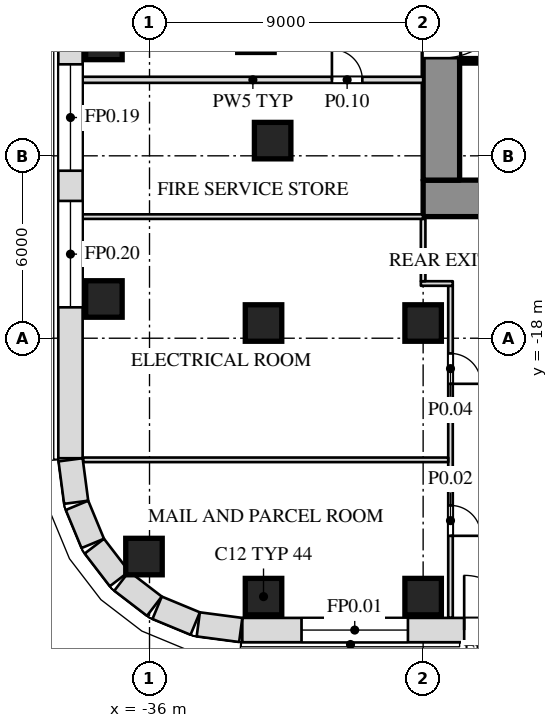
"""IFC4 building model, lengths in metres.
Left out: names, types, materials, properties, quantities, classifications, styles, units other than length and angle.
Written with IfcOpenShell. Run it as: python <this file> out.ifc"""

import sys

from ifc_helpers import new_model, si_unit, direction, frame, frame_2d, origin, origin_2d, place, context, subcontext, project, spatial, rectangle, extrude, element, fill, save


model = new_model("IFC4")
c1 = context("Model", 3, precision=1e-05, world=origin(), true_north=direction((0.0, 1.0)))
c2 = subcontext(c1, "Body", "Model", "MODEL_VIEW")
j1 = project(units=[si_unit("LENGTHUNIT", "METRE"), si_unit("PLANEANGLEUNIT", "RADIAN")], contexts=[c1])
p1 = place(None, origin())
s1 = spatial("IfcSite", under=j1, at=p1, CompositionType="ELEMENT")
p2 = place(p1, origin())
s2 = spatial("IfcBuilding", under=s1, at=p2, CompositionType="ELEMENT")
p3 = place(p2, origin())
s3 = spatial("IfcBuildingStorey", under=s2, at=p3, CompositionType="ELEMENT", Elevation=0.0)
for number, where, z_axis, x_axis in (
    (1, (-32.25, -26.5, 0.0), (0.0, 0.0, 1.0), (1.0, 0.0, 0.0)),
    (2, (-27.0, -26.5, 0.0), (0.0, 0.0, 1.0), (1.0, 0.0, 0.0)),
    (3, (-36.182, -25.182, 0.0), (0.0, 0.0, 1.0), (1.0, 0.0, 0.0)),
    (4, (-32.25, -17.5, 0.0), (0.0, 0.0, 1.0), (1.0, 0.0, 0.0)),
    (5, (-27.0, -17.5, 0.0), (0.0, 0.0, 1.0), (1.0, 0.0, 0.0)),
    (6, (-37.5, -16.709, 0.0), (0.0, 0.0, 1.0), (1.0, 0.0, 0.0)),
    (7, (-31.95, -11.5, 0.0), (0.0, 0.0, 1.0), (1.0, 0.0, 0.0)),
    (8, (-37.5, -8.236, 0.0), (0.0, 0.0, 1.0), (1.0, 0.0, 0.0)),
):
    element("IfcColumn", number, at=place(p3, frame(where, z_axis=z_axis, x_axis=x_axis)), inside=s3, PredefinedType="COLUMN", context=c2, shape_type="SweptSolid", body=[
        extrude(rectangle(XDim=1.2, YDim=1.2, at=origin_2d()), origin(), (0.0, 0.0, 1.0), 9.0),
    ])
p4 = place(p3, frame((-27.0, -13.4, 0.0), z_axis=(0.0, 0.0, 1.0), x_axis=(1.0, 0.0, 0.0)))
e9 = element("IfcWall", 9, at=p4, inside=s3, PredefinedType="SHEAR", context=c2, shape_type="SweptSolid", body=[
    extrude(rectangle(XDim=54.0, YDim=1.2, at=frame_2d((27.0, 0.0))), origin(), (0.0, 0.0, 1.0), 8.7),
])
p5 = place(p4, frame((7.075, 0.0, 0.0)))
e10 = element("IfcOpeningElement", 10, at=p5, cuts=e9, PredefinedType="OPENING", context=c2, shape_type="SweptSolid", body=[
    extrude(rectangle(XDim=1.4, YDim=2.1, at=frame_2d((0.7, 1.05))), frame((0.0, 0.612, 0.0), z_axis=(0.0, -1.0, 0.0), x_axis=(1.0, 0.0, 0.0)), (0.0, 0.0, 1.0), 1.224),
])
p6 = place(p4, frame((16.45, 0.0, 0.0)))
e11 = element("IfcOpeningElement", 11, at=p6, cuts=e9, PredefinedType="OPENING", context=c2, shape_type="SweptSolid", body=[
    extrude(rectangle(XDim=1.0, YDim=2.1, at=frame_2d((0.5, 1.05))), frame((0.0, 0.612, 0.0), z_axis=(0.0, -1.0, 0.0), x_axis=(1.0, 0.0, 0.0)), (0.0, 0.0, 1.0), 1.224),
])
p7 = place(p4, frame((18.525, 0.0, 0.0)))
e12 = element("IfcOpeningElement", 12, at=p7, cuts=e9, PredefinedType="OPENING", context=c2, shape_type="SweptSolid", body=[
    extrude(rectangle(XDim=1.4, YDim=2.1, at=frame_2d((0.7, 1.05))), frame((0.0, 0.612, 0.0), z_axis=(0.0, -1.0, 0.0), x_axis=(1.0, 0.0, 0.0)), (0.0, 0.0, 1.0), 1.224),
])
p8 = place(p4, frame((34.075, 0.0, 0.0)))
e13 = element("IfcOpeningElement", 13, at=p8, cuts=e9, PredefinedType="OPENING", context=c2, shape_type="SweptSolid", body=[
    extrude(rectangle(XDim=1.4, YDim=2.1, at=frame_2d((0.7, 1.05))), frame((0.0, 0.612, 0.0), z_axis=(0.0, -1.0, 0.0), x_axis=(1.0, 0.0, 0.0)), (0.0, 0.0, 1.0), 1.224),
])
p9 = place(p4, frame((36.55, 0.0, 0.0)))
e14 = element("IfcOpeningElement", 14, at=p9, cuts=e9, PredefinedType="OPENING", context=c2, shape_type="SweptSolid", body=[
    extrude(rectangle(XDim=1.0, YDim=2.1, at=frame_2d((0.5, 1.05))), frame((0.0, 0.612, 0.0), z_axis=(0.0, -1.0, 0.0), x_axis=(1.0, 0.0, 0.0)), (0.0, 0.0, 1.0), 1.224),
])
p10 = place(p4, frame((45.525, 0.0, 0.0)))
e15 = element("IfcOpeningElement", 15, at=p10, cuts=e9, PredefinedType="OPENING", context=c2, shape_type="SweptSolid", body=[
    extrude(rectangle(XDim=1.4, YDim=2.1, at=frame_2d((0.7, 1.05))), frame((0.0, 0.612, 0.0), z_axis=(0.0, -1.0, 0.0), x_axis=(1.0, 0.0, 0.0)), (0.0, 0.0, 1.0), 1.224),
])
p11 = place(p3, frame((-26.4, -12.8, 0.0), z_axis=(0.0, 0.0, 1.0), x_axis=(0.0, 1.0, 0.0)))
e16 = element("IfcWall", 16, at=p11, inside=s3, PredefinedType="SHEAR", context=c2, shape_type="SweptSolid", body=[
    extrude(rectangle(XDim=9.6, YDim=1.2, at=frame_2d((4.8, 0.0))), origin(), (0.0, 0.0, 1.0), 8.7),
])
p12 = place(p11, frame((4.012, 0.0, 0.0)))
e17 = element("IfcOpeningElement", 17, at=p12, cuts=e16, PredefinedType="OPENING", context=c2, shape_type="SweptSolid", body=[
    extrude(rectangle(XDim=2.4, YDim=2.1, at=frame_2d((1.2, 1.05))), frame((0.0, 0.612, 0.0), z_axis=(0.0, -1.0, 0.0), x_axis=(1.0, 0.0, 0.0)), (0.0, 0.0, 1.0), 1.224),
])
p13 = place(p3, frame((-26.1, -27.2, 0.0), z_axis=(0.0, 0.0, 1.0), x_axis=(0.0, 1.0, 0.0)))
e18 = element("IfcWall", 18, at=p13, inside=s3, PredefinedType="PARTITIONING", context=c2, shape_type="SweptSolid", body=[
    extrude(rectangle(XDim=10.925, YDim=0.15, at=frame_2d((5.462, 0.0))), origin(), (0.0, 0.0, 1.0), 8.7),
])
p14 = place(p13, frame((2.7, 0.0, 0.0)))
e19 = element("IfcOpeningElement", 19, at=p14, cuts=e18, PredefinedType="OPENING", context=c2, shape_type="SweptSolid", body=[
    extrude(rectangle(XDim=1.0, YDim=2.1, at=frame_2d((0.5, 1.05))), frame((0.0, 0.087, 0.0), z_axis=(0.0, -1.0, 0.0), x_axis=(1.0, 0.0, 0.0)), (0.0, 0.0, 1.0), 0.174),
])
p15 = place(p13, frame((7.7, 0.0, 0.0)))
e20 = element("IfcOpeningElement", 20, at=p15, cuts=e18, PredefinedType="OPENING", context=c2, shape_type="SweptSolid", body=[
    extrude(rectangle(XDim=1.0, YDim=2.1, at=frame_2d((0.5, 1.05))), frame((0.0, 0.087, 0.0), z_axis=(0.0, -1.0, 0.0), x_axis=(1.0, 0.0, 0.0)), (0.0, 0.0, 1.0), 0.174),
])
p16 = place(p3, frame((-38.18, -22.0, 0.0), z_axis=(0.0, 0.0, 1.0), x_axis=(1.0, 0.0, 0.0)))
e21 = element("IfcWall", 21, at=p16, inside=s3, PredefinedType="PARTITIONING", context=c2, shape_type="SweptSolid", body=[
    extrude(rectangle(XDim=12.005, YDim=0.15, at=frame_2d((6.002, 0.0))), origin(), (0.0, 0.0, 1.0), 8.7),
])
p17 = place(p3, frame((-27.075, -16.2, 0.0), z_axis=(0.0, 0.0, 1.0), x_axis=(1.0, 0.0, 0.0)))
e22 = element("IfcWall", 22, at=p17, inside=s3, PredefinedType="PARTITIONING", context=c2, shape_type="SweptSolid", body=[
    extrude(rectangle(XDim=1.05, YDim=0.15, at=frame_2d((0.525, 0.0))), origin(), (0.0, 0.0, 1.0), 8.7),
])
p18 = place(p3, frame((-27.0, -16.125, 0.0), z_axis=(0.0, 0.0, 1.0), x_axis=(0.0, 1.0, 0.0)))
e23 = element("IfcWall", 23, at=p18, inside=s3, PredefinedType="PARTITIONING", context=c2, shape_type="SweptSolid", body=[
    extrude(rectangle(XDim=2.05, YDim=0.15, at=frame_2d((1.025, 0.0))), origin(), (0.0, 0.0, 1.0), 8.088),
])
p19 = place(p3, frame((-38.2, -14.0, 0.0), z_axis=(0.0, 0.0, 1.0), x_axis=(1.0, 0.0, 0.0)))
e24 = element("IfcWall", 24, at=p19, inside=s3, PredefinedType="PARTITIONING", context=c2, shape_type="SweptSolid", body=[
    extrude(rectangle(XDim=11.195, YDim=0.15, at=frame_2d((5.598, 0.0))), origin(), (0.0, 0.0, 1.0), 8.7),
])
p20 = place(p3, frame((-38.2, -9.5, 0.0), z_axis=(0.0, 0.0, 1.0), x_axis=(1.0, 0.0, 0.0)))
e25 = element("IfcWall", 25, at=p20, inside=s3, PredefinedType="PARTITIONING", context=c2, shape_type="SweptSolid", body=[
    extrude(rectangle(XDim=11.2, YDim=0.2, at=frame_2d((5.6, 0.0))), origin(), (0.0, 0.0, 1.0), 8.7),
])
p21 = place(p20, frame((8.2, 0.0, 0.0)))
e26 = element("IfcOpeningElement", 26, at=p21, cuts=e25, PredefinedType="OPENING", context=c2, shape_type="SweptSolid", body=[
    extrude(rectangle(XDim=1.0, YDim=2.1, at=frame_2d((0.5, 1.05))), frame((0.0, 0.112, 0.0), z_axis=(0.0, -1.0, 0.0), x_axis=(1.0, 0.0, 0.0)), (0.0, 0.0, 1.0), 0.224),
])
p22 = place(p3, frame((-32.948, -27.6, 0.0), z_axis=(0.0, 0.0, 1.0), x_axis=(1.0, 0.0, 0.0)))
e27 = element("IfcWall", 27, at=p22, inside=s3, PredefinedType="SOLIDWALL", context=c2, shape_type="SweptSolid", body=[
    extrude(rectangle(XDim=65.895, YDim=0.8, at=frame_2d((32.948, 0.0))), origin(), (0.0, 0.0, 1.0), 8.7),
])
p23 = place(p22, frame((1.948, 0.0, 1.0)))
e28 = element("IfcOpeningElement", 28, at=p23, cuts=e27, PredefinedType="OPENING", context=c2, shape_type="SweptSolid", body=[
    extrude(rectangle(XDim=3.5, YDim=5.5, at=frame_2d((1.75, 2.75))), frame((0.0, 0.412, 0.0), z_axis=(0.0, -1.0, 0.0), x_axis=(1.0, 0.0, 0.0)), (0.0, 0.0, 1.0), 0.824),
])
p24 = place(p22, frame((10.948, 0.0, 1.0)))
e29 = element("IfcOpeningElement", 29, at=p24, cuts=e27, PredefinedType="OPENING", context=c2, shape_type="SweptSolid", body=[
    extrude(rectangle(XDim=3.5, YDim=5.5, at=frame_2d((1.75, 2.75))), frame((0.0, 0.412, 0.0), z_axis=(0.0, -1.0, 0.0), x_axis=(1.0, 0.0, 0.0)), (0.0, 0.0, 1.0), 0.824),
])
p25 = place(p22, frame((19.948, 0.0, 1.0)))
e30 = element("IfcOpeningElement", 30, at=p25, cuts=e27, PredefinedType="OPENING", context=c2, shape_type="SweptSolid", body=[
    extrude(rectangle(XDim=3.5, YDim=5.5, at=frame_2d((1.75, 2.75))), frame((0.0, 0.412, 0.0), z_axis=(0.0, -1.0, 0.0), x_axis=(1.0, 0.0, 0.0)), (0.0, 0.0, 1.0), 0.824),
])
p26 = place(p22, frame((42.448, 0.0, 1.0)))
e31 = element("IfcOpeningElement", 31, at=p26, cuts=e27, PredefinedType="OPENING", context=c2, shape_type="SweptSolid", body=[
    extrude(rectangle(XDim=3.5, YDim=5.5, at=frame_2d((1.75, 2.75))), frame((0.0, 0.412, 0.0), z_axis=(0.0, -1.0, 0.0), x_axis=(1.0, 0.0, 0.0)), (0.0, 0.0, 1.0), 0.824),
])
p27 = place(p22, frame((51.448, 0.0, 1.0)))
e32 = element("IfcOpeningElement", 32, at=p27, cuts=e27, PredefinedType="OPENING", context=c2, shape_type="SweptSolid", body=[
    extrude(rectangle(XDim=3.5, YDim=5.5, at=frame_2d((1.75, 2.75))), frame((0.0, 0.412, 0.0), z_axis=(0.0, -1.0, 0.0), x_axis=(1.0, 0.0, 0.0)), (0.0, 0.0, 1.0), 0.824),
])
p28 = place(p22, frame((60.448, 0.0, 1.0)))
e33 = element("IfcOpeningElement", 33, at=p28, cuts=e27, PredefinedType="OPENING", context=c2, shape_type="SweptSolid", body=[
    extrude(rectangle(XDim=3.5, YDim=5.5, at=frame_2d((1.75, 2.75))), frame((0.0, 0.412, 0.0), z_axis=(0.0, -1.0, 0.0), x_axis=(1.0, 0.0, 0.0)), (0.0, 0.0, 1.0), 0.824),
])
p29 = place(p22, frame((7.298, 0.0, 0.0)))
e34 = element("IfcOpeningElement", 34, at=p29, cuts=e27, PredefinedType="OPENING", context=c2, shape_type="SweptSolid", body=[
    extrude(rectangle(XDim=1.8, YDim=2.4, at=frame_2d((0.9, 1.2))), frame((0.0, 0.412, 0.0), z_axis=(0.0, -1.0, 0.0), x_axis=(1.0, 0.0, 0.0)), (0.0, 0.0, 1.0), 0.824),
])
p30 = place(p22, frame((16.648, 0.0, 0.0)))
e35 = element("IfcOpeningElement", 35, at=p30, cuts=e27, PredefinedType="OPENING", context=c2, shape_type="SweptSolid", body=[
    extrude(rectangle(XDim=1.1, YDim=2.4, at=frame_2d((0.55, 1.2))), frame((0.0, 0.412, 0.0), z_axis=(0.0, -1.0, 0.0), x_axis=(1.0, 0.0, 0.0)), (0.0, 0.0, 1.0), 0.824),
])
p31 = place(p22, frame((25.298, 0.0, 0.0)))
e36 = element("IfcOpeningElement", 36, at=p31, cuts=e27, PredefinedType="OPENING", context=c2, shape_type="SweptSolid", body=[
    extrude(rectangle(XDim=1.8, YDim=2.4, at=frame_2d((0.9, 1.2))), frame((0.0, 0.412, 0.0), z_axis=(0.0, -1.0, 0.0), x_axis=(1.0, 0.0, 0.0)), (0.0, 0.0, 1.0), 0.824),
])
p32 = place(p22, frame((28.498, 0.0, 0.0)))
e37 = element("IfcOpeningElement", 37, at=p32, cuts=e27, PredefinedType="OPENING", context=c2, shape_type="SweptSolid", body=[
    extrude(rectangle(XDim=3.5, YDim=4.5, at=frame_2d((1.75, 2.25))), frame((0.0, 0.412, 0.0), z_axis=(0.0, -1.0, 0.0), x_axis=(1.0, 0.0, 0.0)), (0.0, 0.0, 1.0), 0.824),
])
p33 = place(p22, frame((33.898, 0.0, 0.0)))
e38 = element("IfcOpeningElement", 38, at=p33, cuts=e27, PredefinedType="OPENING", context=c2, shape_type="SweptSolid", body=[
    extrude(rectangle(XDim=3.5, YDim=4.5, at=frame_2d((1.75, 2.25))), frame((0.0, 0.412, 0.0), z_axis=(0.0, -1.0, 0.0), x_axis=(1.0, 0.0, 0.0)), (0.0, 0.0, 1.0), 0.824),
])
p34 = place(p22, frame((38.798, 0.0, 0.0)))
e39 = element("IfcOpeningElement", 39, at=p34, cuts=e27, PredefinedType="OPENING", context=c2, shape_type="SweptSolid", body=[
    extrude(rectangle(XDim=1.8, YDim=2.4, at=frame_2d((0.9, 1.2))), frame((0.0, 0.412, 0.0), z_axis=(0.0, -1.0, 0.0), x_axis=(1.0, 0.0, 0.0)), (0.0, 0.0, 1.0), 0.824),
])
p35 = place(p22, frame((48.148, 0.0, 0.0)))
e40 = element("IfcOpeningElement", 40, at=p35, cuts=e27, PredefinedType="OPENING", context=c2, shape_type="SweptSolid", body=[
    extrude(rectangle(XDim=1.1, YDim=2.4, at=frame_2d((0.55, 1.2))), frame((0.0, 0.412, 0.0), z_axis=(0.0, -1.0, 0.0), x_axis=(1.0, 0.0, 0.0)), (0.0, 0.0, 1.0), 0.824),
])
p36 = place(p22, frame((56.798, 0.0, 0.0)))
e41 = element("IfcOpeningElement", 41, at=p36, cuts=e27, PredefinedType="OPENING", context=c2, shape_type="SweptSolid", body=[
    extrude(rectangle(XDim=1.8, YDim=2.4, at=frame_2d((0.9, 1.2))), frame((0.0, 0.412, 0.0), z_axis=(0.0, -1.0, 0.0), x_axis=(1.0, 0.0, 0.0)), (0.0, 0.0, 1.0), 0.824),
])
p37 = place(p3, frame((-38.6, 13.948, 0.0), z_axis=(0.0, 0.0, 1.0), x_axis=(0.0, -1.0, 0.0)))
e42 = element("IfcWall", 42, at=p37, inside=s3, PredefinedType="SOLIDWALL", context=c2, shape_type="SweptSolid", body=[
    extrude(rectangle(XDim=35.895, YDim=0.8, at=frame_2d((17.948, 0.0))), origin(), (0.0, 0.0, 1.0), 8.7),
])
p38 = place(p37, frame((4.964, 0.0, 1.0)))
e43 = element("IfcOpeningElement", 43, at=p38, cuts=e42, PredefinedType="OPENING", context=c2, shape_type="SweptSolid", body=[
    extrude(rectangle(XDim=3.5, YDim=5.5, at=frame_2d((1.75, 2.75))), frame((0.0, 0.412, 0.0), z_axis=(0.0, -1.0, 0.0), x_axis=(1.0, 0.0, 0.0)), (0.0, 0.0, 1.0), 0.824),
])
p39 = place(p37, frame((9.458, 0.0, 1.0)))
e44 = element("IfcOpeningElement", 44, at=p39, cuts=e42, PredefinedType="OPENING", context=c2, shape_type="SweptSolid", body=[
    extrude(rectangle(XDim=3.5, YDim=5.5, at=frame_2d((1.75, 2.75))), frame((0.0, 0.412, 0.0), z_axis=(0.0, -1.0, 0.0), x_axis=(1.0, 0.0, 0.0)), (0.0, 0.0, 1.0), 0.824),
])
p40 = place(p37, frame((13.951, 0.0, 1.0)))
e45 = element("IfcOpeningElement", 45, at=p40, cuts=e42, PredefinedType="OPENING", context=c2, shape_type="SweptSolid", body=[
    extrude(rectangle(XDim=3.5, YDim=5.5, at=frame_2d((1.75, 2.75))), frame((0.0, 0.412, 0.0), z_axis=(0.0, -1.0, 0.0), x_axis=(1.0, 0.0, 0.0)), (0.0, 0.0, 1.0), 0.824),
])
p41 = place(p37, frame((22.938, 0.0, 1.0)))
e46 = element("IfcOpeningElement", 46, at=p41, cuts=e42, PredefinedType="OPENING", context=c2, shape_type="SweptSolid", body=[
    extrude(rectangle(XDim=3.5, YDim=5.5, at=frame_2d((1.75, 2.75))), frame((0.0, 0.412, 0.0), z_axis=(0.0, -1.0, 0.0), x_axis=(1.0, 0.0, 0.0)), (0.0, 0.0, 1.0), 0.824),
])
p42 = place(p37, frame((27.431, 0.0, 1.0)))
e47 = element("IfcOpeningElement", 47, at=p42, cuts=e42, PredefinedType="OPENING", context=c2, shape_type="SweptSolid", body=[
    extrude(rectangle(XDim=3.5, YDim=5.5, at=frame_2d((1.75, 2.75))), frame((0.0, 0.412, 0.0), z_axis=(0.0, -1.0, 0.0), x_axis=(1.0, 0.0, 0.0)), (0.0, 0.0, 1.0), 0.824),
])
p43 = place(p37, frame((19.294, 0.0, 0.0)))
e48 = element("IfcOpeningElement", 48, at=p43, cuts=e42, PredefinedType="OPENING", context=c2, shape_type="SweptSolid", body=[
    extrude(rectangle(XDim=1.8, YDim=2.4, at=frame_2d((0.9, 1.2))), frame((0.0, 0.412, 0.0), z_axis=(0.0, -1.0, 0.0), x_axis=(1.0, 0.0, 0.0)), (0.0, 0.0, 1.0), 0.824),
])
p44 = place(p3, frame((-38.597, -22.0, 0.0), z_axis=(0.0, 0.0, 1.0), x_axis=(0.130517283865, -0.99144603414, 0.0)))
e49 = element("IfcWall", 49, at=p44, inside=s3, PredefinedType="SOLIDWALL", context=c2, shape_type="SweptSolid", body=[
    extrude(rectangle(XDim=1.408, YDim=0.8, at=frame_2d((0.704, 0.0))), origin(), (0.0, 0.0, 1.0), 8.7),
])
p45 = place(p3, frame((-38.386, -23.497, 0.0), z_axis=(0.0, 0.0, 1.0), x_axis=(0.38276009378, -0.923847774587, 0.0)))
e50 = element("IfcWall", 50, at=p45, inside=s3, PredefinedType="SOLIDWALL", context=c2, shape_type="SweptSolid", body=[
    extrude(rectangle(XDim=1.355, YDim=0.8, at=frame_2d((0.678, 0.0))), origin(), (0.0, 0.0, 1.0), 8.7),
])
for number, where, z_axis, x_axis in (
    (51, (-37.815, -24.84, 0.0), (0.0, 0.0, 1.0), (0.609, -0.793, 0.0)),
    (52, (-36.916, -25.989, 0.0), (0.0, 0.0, 1.0), (0.793, -0.609, 0.0)),
):
    element("IfcWall", number, at=place(p3, frame(where, z_axis=z_axis, x_axis=x_axis)), inside=s3, PredefinedType="SOLIDWALL", context=c2, shape_type="SweptSolid", body=[
        extrude(rectangle(XDim=1.356, YDim=0.8, at=frame_2d((0.678, 0.0))), origin(), (0.0, 0.0, 1.0), 8.7),
    ])
p46 = place(p3, frame((-35.75, -26.867, 0.0), z_axis=(0.0, 0.0, 1.0), x_axis=(0.923847774587, -0.38276009378, 0.0)))
e53 = element("IfcWall", 53, at=p46, inside=s3, PredefinedType="SOLIDWALL", context=c2, shape_type="SweptSolid", body=[
    extrude(rectangle(XDim=1.355, YDim=0.8, at=frame_2d((0.678, 0.0))), origin(), (0.0, 0.0, 1.0), 8.7),
])
p47 = place(p3, frame((-34.396, -27.413, 0.0), z_axis=(0.0, 0.0, 1.0), x_axis=(0.99144603414, -0.130517283865, 0.0)))
e54 = element("IfcWall", 54, at=p47, inside=s3, PredefinedType="SOLIDWALL", context=c2, shape_type="SweptSolid", body=[
    extrude(rectangle(XDim=1.408, YDim=0.8, at=frame_2d((0.704, 0.0))), origin(), (0.0, 0.0, 1.0), 8.7),
])
p48 = place(p3, frame((-25.8, -8.875, 0.0), z_axis=(0.0, 0.0, 1.0), x_axis=(1.0, 0.0, 0.0)))
e55 = element("IfcWall", 55, at=p48, inside=s3, PredefinedType="SHEAR", context=c2, shape_type="SweptSolid", body=[
    extrude(rectangle(XDim=7.5, YDim=0.15, at=frame_2d((3.75, 0.0))), origin(), (0.0, 0.0, 1.0), 8.7),
])
p49 = place(p48, frame((5.875, 0.0, 0.0)))
e56 = element("IfcOpeningElement", 56, at=p49, cuts=e55, PredefinedType="OPENING", context=c2, shape_type="SweptSolid", body=[
    extrude(rectangle(XDim=1.4, YDim=2.1, at=frame_2d((0.7, 1.05))), frame((0.0, 0.087, 0.0), z_axis=(0.0, -1.0, 0.0), x_axis=(1.0, 0.0, 0.0)), (0.0, 0.0, 1.0), 0.174),
])
p50 = place(p14, origin())
e57 = element("IfcDoor", 57, at=p50, inside=s3, OperationType="SINGLE_SWING_RIGHT", PredefinedType="DOOR", context=c2, shape_type="SweptSolid", body=[
    extrude(rectangle(XDim=1.0, YDim=2.1, at=frame_2d((0.5, 1.05))), frame((0.0, 0.025, 0.0), z_axis=(0.0, -1.0, 0.0), x_axis=(1.0, 0.0, 0.0)), (0.0, 0.0, 1.0), 0.05),
])
fill(e19, e57)
p51 = place(p15, origin())
e58 = element("IfcDoor", 58, at=p51, inside=s3, OperationType="SINGLE_SWING_RIGHT", PredefinedType="DOOR", context=c2, shape_type="SweptSolid", body=[
    extrude(rectangle(XDim=1.0, YDim=2.1, at=frame_2d((0.5, 1.05))), frame((0.0, 0.025, 0.0), z_axis=(0.0, -1.0, 0.0), x_axis=(1.0, 0.0, 0.0)), (0.0, 0.0, 1.0), 0.05),
])
fill(e20, e58)
p52 = place(p21, origin())
e59 = element("IfcDoor", 59, at=p52, inside=s3, OperationType="SINGLE_SWING_LEFT", PredefinedType="DOOR", context=c2, shape_type="SweptSolid", body=[
    extrude(rectangle(XDim=1.0, YDim=2.1, at=frame_2d((0.5, 1.05))), frame((0.0, 0.025, 0.0), z_axis=(0.0, -1.0, 0.0), x_axis=(1.0, 0.0, 0.0)), (0.0, 0.0, 1.0), 0.05),
])
fill(e26, e59)
p53 = place(p23, origin())
e60 = element("IfcWindow", 60, at=p53, inside=s3, PartitioningType="SINGLE_PANEL", PredefinedType="WINDOW", context=c2, shape_type="SweptSolid", body=[
    extrude(rectangle(XDim=3.5, YDim=5.5, at=frame_2d((1.75, 2.75))), frame((0.0, 0.03, 0.0), z_axis=(0.0, -1.0, 0.0), x_axis=(1.0, 0.0, 0.0)), (0.0, 0.0, 1.0), 0.06),
])
fill(e28, e60)
p54 = place(p41, origin())
e61 = element("IfcWindow", 61, at=p54, inside=s3, PartitioningType="SINGLE_PANEL", PredefinedType="WINDOW", context=c2, shape_type="SweptSolid", body=[
    extrude(rectangle(XDim=3.5, YDim=5.5, at=frame_2d((1.75, 2.75))), frame((0.0, 0.03, 0.0), z_axis=(0.0, -1.0, 0.0), x_axis=(1.0, 0.0, 0.0)), (0.0, 0.0, 1.0), 0.06),
])
fill(e46, e61)
p55 = place(p42, origin())
e62 = element("IfcWindow", 62, at=p55, inside=s3, PartitioningType="SINGLE_PANEL", PredefinedType="WINDOW", context=c2, shape_type="SweptSolid", body=[
    extrude(rectangle(XDim=3.5, YDim=5.5, at=frame_2d((1.75, 2.75))), frame((0.0, 0.03, 0.0), z_axis=(0.0, -1.0, 0.0), x_axis=(1.0, 0.0, 0.0)), (0.0, 0.0, 1.0), 0.06),
])
fill(e47, e62)
p56 = place(p29, frame((1.8, 0.0, 0.0), z_axis=(0.0, 0.0, 1.0), x_axis=(-1.0, 0.0, 0.0)))
e63 = element("IfcDoor", 63, at=p56, inside=s3, OperationType="DOUBLE_DOOR_SINGLE_SWING", PredefinedType="DOOR", context=c2, shape_type="SweptSolid", body=[
    extrude(rectangle(XDim=1.8, YDim=2.4, at=frame_2d((0.9, 1.2))), frame((0.0, 0.025, 0.0), z_axis=(0.0, -1.0, 0.0), x_axis=(1.0, 0.0, 0.0)), (0.0, 0.0, 1.0), 0.05),
])
fill(e34, e63)
p57 = place(p12, origin())
e64 = element("IfcDoor", 64, at=p57, inside=s3, OperationType="DOUBLE_DOOR_SINGLE_SWING", PredefinedType="DOOR", context=c2, shape_type="SweptSolid", body=[
    extrude(rectangle(XDim=2.4, YDim=2.1, at=frame_2d((1.2, 1.05))), frame((0.0, 0.025, 0.0), z_axis=(0.0, -1.0, 0.0), x_axis=(1.0, 0.0, 0.0)), (0.0, 0.0, 1.0), 0.05),
])
fill(e17, e64)
save(model, sys.argv[1])
